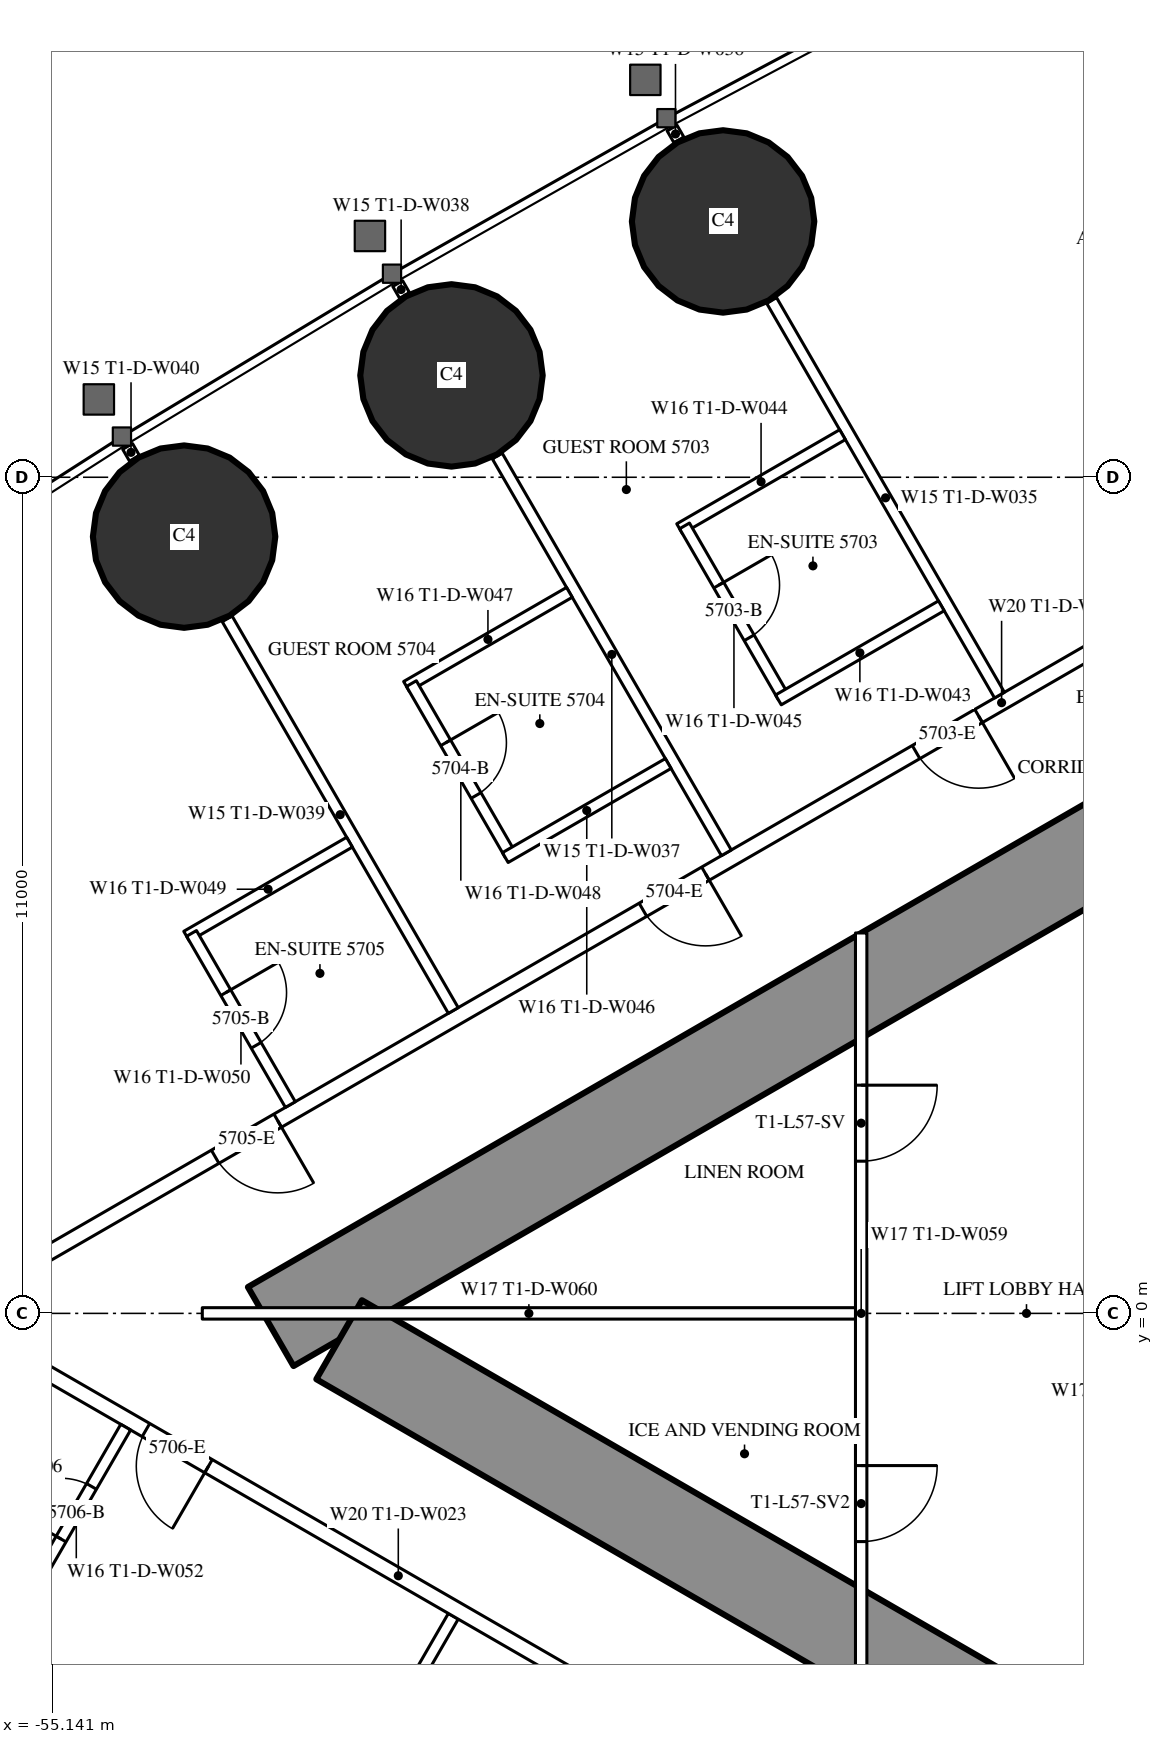
"""IFC4 building model, lengths in metres.
Left out: names, types, materials, properties, quantities, classifications, styles, units other than length and angle.
Written with IfcOpenShell. Run it as: python <this file> out.ifc"""

import sys

from ifc_helpers import new_model, si_unit, direction, frame, frame_2d, origin, origin_2d, place, context, subcontext, project, spatial, rectangle, circle, extrude, element, fill, save


model = new_model("IFC4")
c1 = context("Model", 3, precision=1e-05, world=origin(), true_north=direction((0.0, 1.0)))
c2 = subcontext(c1, "Body", "Model", "MODEL_VIEW")
j1 = project(units=[si_unit("LENGTHUNIT", "METRE"), si_unit("PLANEANGLEUNIT", "RADIAN")], contexts=[c1])
p1 = place(None, origin())
s1 = spatial("IfcSite", under=j1, at=p1, CompositionType="ELEMENT")
p2 = place(p1, origin())
s2 = spatial("IfcBuilding", under=s1, at=p2, CompositionType="ELEMENT")
p3 = place(p2, frame((0.0, 0.0, 215.3)))
s3 = spatial("IfcBuildingStorey", under=s2, at=p3, CompositionType="ELEMENT", Elevation=215.3)
for number, where, z_axis, x_axis in (
    (1, (-46.317, 14.365, 0.0), (0.0, 0.0, 1.0), (1.0, 0.0, 0.0)),
    (2, (-49.89, 12.34, 0.0), (0.0, 0.0, 1.0), (1.0, 0.0, 0.0)),
    (3, (-53.408, 10.219, 0.0), (0.0, 0.0, 1.0), (1.0, 0.0, 0.0)),
):
    element("IfcColumn", number, at=place(p3, frame(where, z_axis=z_axis, x_axis=x_axis)), inside=s3, PredefinedType="COLUMN", context=c2, shape_type="SweptSolid", body=[
        extrude(circle(Radius=1.2, at=origin_2d()), origin(), (0.0, 0.0, 1.0), 3.6),
    ])
p4 = place(p3, frame((-27.2, 14.3, 0.0), z_axis=(0.0, 0.0, 1.0), x_axis=(-0.866026593062, -0.499997940104, 0.0)))
e4 = element("IfcWall", 4, at=p4, inside=s3, PredefinedType="SHEAR", context=c2, shape_type="SweptSolid", body=[
    extrude(rectangle(XDim=28.946, YDim=1.2, at=frame_2d((14.473, 0.0))), origin(), (0.0, 0.0, 1.0), 3.6),
])
p5 = place(p4, frame((4.6, 0.0, 0.0)))
e5 = element("IfcOpeningElement", 5, at=p5, cuts=e4, PredefinedType="OPENING", context=c2, shape_type="SweptSolid", body=[
    extrude(rectangle(XDim=1.0, YDim=2.2, at=frame_2d((0.5, 1.1))), frame((0.0, 0.61, 0.0), z_axis=(0.0, -1.0, 0.0), x_axis=(1.0, 0.0, 0.0)), (0.0, 0.0, 1.0), 1.22),
])
p6 = place(p4, frame((13.395, 0.0, 0.0)))
e6 = element("IfcOpeningElement", 6, at=p6, cuts=e4, PredefinedType="OPENING", context=c2, shape_type="SweptSolid", body=[
    extrude(rectangle(XDim=1.8, YDim=2.2, at=frame_2d((0.9, 1.1))), frame((0.0, 0.61, 0.0), z_axis=(0.0, -1.0, 0.0), x_axis=(1.0, 0.0, 0.0)), (0.0, 0.0, 1.0), 1.22),
])
p7 = place(p3, frame((-27.2, -14.3, 0.0), z_axis=(0.0, 0.0, 1.0), x_axis=(-0.866024021859, 0.500002393557, 0.0)))
e7 = element("IfcWall", 7, at=p7, inside=s3, PredefinedType="SHEAR", context=c2, shape_type="SweptSolid", body=[
    extrude(rectangle(XDim=27.907, YDim=1.2, at=frame_2d((13.954, 0.0))), origin(), (0.0, 0.0, 1.0), 3.6),
])
p8 = place(p7, frame((4.6, 0.0, 0.0)))
e8 = element("IfcOpeningElement", 8, at=p8, cuts=e7, PredefinedType="OPENING", context=c2, shape_type="SweptSolid", body=[
    extrude(rectangle(XDim=1.0, YDim=2.2, at=frame_2d((0.5, 1.1))), frame((0.0, 0.61, 0.0), z_axis=(0.0, -1.0, 0.0), x_axis=(1.0, 0.0, 0.0)), (0.0, 0.0, 1.0), 1.22),
])
p9 = place(p7, frame((13.395, 0.0, 0.0)))
e9 = element("IfcOpeningElement", 9, at=p9, cuts=e7, PredefinedType="OPENING", context=c2, shape_type="SweptSolid", body=[
    extrude(rectangle(XDim=1.8, YDim=2.2, at=frame_2d((0.9, 1.1))), frame((0.0, 0.61, 0.0), z_axis=(0.0, -1.0, 0.0), x_axis=(1.0, 0.0, 0.0)), (0.0, 0.0, 1.0), 1.22),
])
p10 = place(p3, frame((-28.737, 16.068, 0.0), z_axis=(0.0, 0.0, 1.0), x_axis=(-0.866026057212, -0.499998868229, 0.0)))
e10 = element("IfcWall", 10, at=p10, inside=s3, PredefinedType="PARTITIONING", context=c2, shape_type="SweptSolid", body=[
    extrude(rectangle(XDim=32.137, YDim=0.2, at=frame_2d((16.068, 0.0))), origin(), (0.0, 0.0, 1.0), 3.35),
])
p11 = place(p10, frame((1.08, 0.0, 0.0)))
e11 = element("IfcOpeningElement", 11, at=p11, cuts=e10, PredefinedType="OPENING", context=c2, shape_type="SweptSolid", body=[
    extrude(rectangle(XDim=1.8, YDim=2.03, at=frame_2d((0.9, 1.015))), frame((0.0, 0.11, 0.0), z_axis=(0.0, -1.0, 0.0), x_axis=(1.0, 0.0, 0.0)), (0.0, 0.0, 1.0), 0.22),
])
p12 = place(p10, frame((6.86, 0.0, 0.0)))
e12 = element("IfcOpeningElement", 12, at=p12, cuts=e10, PredefinedType="OPENING", context=c2, shape_type="SweptSolid", body=[
    extrude(rectangle(XDim=1.0, YDim=2.2, at=frame_2d((0.5, 1.1))), frame((0.0, 0.11, 0.0), z_axis=(0.0, -1.0, 0.0), x_axis=(1.0, 0.0, 0.0)), (0.0, 0.0, 1.0), 0.22),
])
p13 = place(p10, frame((16.418, 0.0, 0.0)))
e13 = element("IfcOpeningElement", 13, at=p13, cuts=e10, PredefinedType="OPENING", context=c2, shape_type="SweptSolid", body=[
    extrude(rectangle(XDim=0.95, YDim=2.2, at=frame_2d((0.475, 1.1))), frame((0.0, 0.11, 0.0), z_axis=(0.0, -1.0, 0.0), x_axis=(1.0, 0.0, 0.0)), (0.0, 0.0, 1.0), 0.22),
])
p14 = place(p10, frame((20.567, 0.0, 0.0)))
e14 = element("IfcOpeningElement", 14, at=p14, cuts=e10, PredefinedType="OPENING", context=c2, shape_type="SweptSolid", body=[
    extrude(rectangle(XDim=0.95, YDim=2.2, at=frame_2d((0.475, 1.1))), frame((0.0, 0.11, 0.0), z_axis=(0.0, -1.0, 0.0), x_axis=(1.0, 0.0, 0.0)), (0.0, 0.0, 1.0), 0.22),
])
p15 = place(p10, frame((27.065, 0.0, 0.0)))
e15 = element("IfcOpeningElement", 15, at=p15, cuts=e10, PredefinedType="OPENING", context=c2, shape_type="SweptSolid", body=[
    extrude(rectangle(XDim=0.95, YDim=2.2, at=frame_2d((0.475, 1.1))), frame((0.0, 0.11, 0.0), z_axis=(0.0, -1.0, 0.0), x_axis=(1.0, 0.0, 0.0)), (0.0, 0.0, 1.0), 0.22),
])
p16 = place(p3, frame((-42.68, 8.134, 0.0), z_axis=(0.0, 0.0, 1.0), x_axis=(-0.499984479505, 0.866034364361, 0.0)))
e16 = element("IfcWall", 16, at=p16, inside=s3, PredefinedType="PARTITIONING", context=c2, shape_type="SweptSolid", body=[
    extrude(rectangle(XDim=5.995, YDim=0.15, at=frame_2d((2.998, 0.0))), origin(), (0.0, 0.0, 1.0), 2.45),
])
p17 = place(p3, frame((-46.898, 15.439, 0.0), z_axis=(0.0, 0.0, 1.0), x_axis=(-0.500232303069, 0.865891241997, 0.0)))
e17 = element("IfcWall", 17, at=p17, inside=s3, PredefinedType="PARTITIONING", context=c2, shape_type="SweptSolid", body=[
    extrude(rectangle(XDim=0.18, YDim=0.15, at=frame_2d((0.09, 0.0))), origin(), (0.0, 0.0, 1.0), 2.45),
])
p18 = place(p3, frame((-46.274, 6.059, 0.0), z_axis=(0.0, 0.0, 1.0), x_axis=(-0.500020471368, 0.866013584312, 0.0)))
e18 = element("IfcWall", 18, at=p18, inside=s3, PredefinedType="PARTITIONING", context=c2, shape_type="SweptSolid", body=[
    extrude(rectangle(XDim=6.028, YDim=0.15, at=frame_2d((3.014, 0.0))), origin(), (0.0, 0.0, 1.0), 2.45),
])
p19 = place(p3, frame((-50.508, 13.392, 0.0), z_axis=(0.0, 0.0, 1.0), x_axis=(-0.499644091975, 0.866230789891, 0.0)))
e19 = element("IfcWall", 19, at=p19, inside=s3, PredefinedType="PARTITIONING", context=c2, shape_type="SweptSolid", body=[
    extrude(rectangle(XDim=0.18, YDim=0.15, at=frame_2d((0.09, 0.0))), origin(), (0.0, 0.0, 1.0), 2.45),
])
p20 = place(p3, frame((-49.866, 3.985, 0.0), z_axis=(0.0, 0.0, 1.0), x_axis=(-0.500000694566, 0.866025002776, 0.0)))
e20 = element("IfcWall", 20, at=p20, inside=s3, PredefinedType="PARTITIONING", context=c2, shape_type="SweptSolid", body=[
    extrude(rectangle(XDim=5.95, YDim=0.15, at=frame_2d((2.975, 0.0))), origin(), (0.0, 0.0, 1.0), 2.45),
])
p21 = place(p3, frame((-54.061, 11.25, 0.0), z_axis=(0.0, 0.0, 1.0), x_axis=(-0.500391173478, 0.865799441849, 0.0)))
e21 = element("IfcWall", 21, at=p21, inside=s3, PredefinedType="PARTITIONING", context=c2, shape_type="SweptSolid", body=[
    extrude(rectangle(XDim=0.179, YDim=0.15, at=frame_2d((0.089, 0.0))), origin(), (0.0, 0.0, 1.0), 2.45),
])
p22 = place(p3, frame((-49.866, -3.985, 0.0), z_axis=(0.0, 0.0, 1.0), x_axis=(-0.500000694566, -0.866025002776, 0.0)))
e22 = element("IfcWall", 22, at=p22, inside=s3, PredefinedType="PARTITIONING", context=c2, shape_type="SweptSolid", body=[
    extrude(rectangle(XDim=5.95, YDim=0.15, at=frame_2d((2.975, 0.0))), origin(), (0.0, 0.0, 1.0), 2.45),
])
p23 = place(p22, frame((3.5, 0.0, 0.0)))
e23 = element("IfcOpeningElement", 23, at=p23, cuts=e22, PredefinedType="OPENING", context=c2, shape_type="SweptSolid", body=[
    extrude(rectangle(XDim=0.9, YDim=2.2, at=frame_2d((0.45, 1.1))), frame((0.0, 0.085, 0.0), z_axis=(0.0, -1.0, 0.0), x_axis=(1.0, 0.0, 0.0)), (0.0, 0.0, 1.0), 0.17),
])
p24 = place(p3, frame((-44.715, -6.844, 0.0), z_axis=(0.0, 0.0, 1.0), x_axis=(-0.866025261224, 0.500000246922, 0.0)))
e24 = element("IfcWall", 24, at=p24, inside=s3, PredefinedType="PARTITIONING", context=c2, shape_type="SweptSolid", body=[
    extrude(rectangle(XDim=13.567, YDim=0.2, at=frame_2d((6.783, 0.0))), origin(), (0.0, 0.0, 1.0), 3.35),
])
p25 = place(p24, frame((9.667, 0.0, 0.0)))
e25 = element("IfcOpeningElement", 25, at=p25, cuts=e24, PredefinedType="OPENING", context=c2, shape_type="SweptSolid", body=[
    extrude(rectangle(XDim=0.95, YDim=2.2, at=frame_2d((0.475, 1.1))), frame((0.0, 0.11, 0.0), z_axis=(0.0, -1.0, 0.0), x_axis=(1.0, 0.0, 0.0)), (0.0, 0.0, 1.0), 0.22),
])
p26 = place(p24, frame((2.117, 0.0, 0.0)))
e26 = element("IfcOpeningElement", 26, at=p26, cuts=e24, PredefinedType="OPENING", context=c2, shape_type="SweptSolid", body=[
    extrude(rectangle(XDim=0.95, YDim=2.2, at=frame_2d((0.475, 1.1))), frame((0.0, 0.11, 0.0), z_axis=(0.0, -1.0, 0.0), x_axis=(1.0, 0.0, 0.0)), (0.0, 0.0, 1.0), 0.22),
])
p27 = place(p24, frame((0.5, 0.0, 0.0)))
e27 = element("IfcOpeningElement", 27, at=p27, cuts=e24, PredefinedType="OPENING", context=c2, shape_type="SweptSolid", body=[
    extrude(rectangle(XDim=0.967, YDim=2.2, at=frame_2d((0.483, 1.1))), frame((0.0, 0.11, 0.0), z_axis=(0.0, -1.0, 0.0), x_axis=(1.0, 0.0, 0.0)), (0.0, 0.0, 1.0), 0.22),
])
p28 = place(p3, frame((-44.745, 11.56, 0.0), z_axis=(0.0, 0.0, 1.0), x_axis=(-0.866006523861, -0.500032699561, 0.0)))
e28 = element("IfcWall", 28, at=p28, inside=s3, PredefinedType="PARTITIONING", context=c2, shape_type="SweptSolid", body=[
    extrude(rectangle(XDim=2.475, YDim=0.15, at=frame_2d((1.237, 0.0))), origin(), (0.0, 0.0, 1.0), 3.35),
])
p29 = place(p3, frame((-45.524, 8.109, 0.0), z_axis=(0.0, 0.0, 1.0), x_axis=(-0.49997716683, 0.86603858612, 0.0)))
e29 = element("IfcWall", 29, at=p29, inside=s3, PredefinedType="PARTITIONING", context=c2, shape_type="SweptSolid", body=[
    extrude(rectangle(XDim=2.6, YDim=0.15, at=frame_2d((1.3, 0.0))), origin(), (0.0, 0.0, 1.0), 3.35),
])
p30 = place(p29, frame((0.9, 0.0, 0.0)))
e30 = element("IfcOpeningElement", 30, at=p30, cuts=e29, PredefinedType="OPENING", context=c2, shape_type="SweptSolid", body=[
    extrude(rectangle(XDim=0.8, YDim=2.2, at=frame_2d((0.4, 1.1))), frame((0.0, 0.085, 0.0), z_axis=(0.0, -1.0, 0.0), x_axis=(1.0, 0.0, 0.0)), (0.0, 0.0, 1.0), 0.17),
])
p31 = place(p3, frame((-43.445, 9.309, 0.0), z_axis=(0.0, 0.0, 1.0), x_axis=(-0.866031185235, -0.4999899861, 0.0)))
e31 = element("IfcWall", 31, at=p31, inside=s3, PredefinedType="PARTITIONING", context=c2, shape_type="SweptSolid", body=[
    extrude(rectangle(XDim=2.475, YDim=0.15, at=frame_2d((1.238, 0.0))), origin(), (0.0, 0.0, 1.0), 3.35),
])
p32 = place(p3, frame((-48.339, 9.486, 0.0), z_axis=(0.0, 0.0, 1.0), x_axis=(-0.866006523861, -0.500032699561, 0.0)))
e32 = element("IfcWall", 32, at=p32, inside=s3, PredefinedType="PARTITIONING", context=c2, shape_type="SweptSolid", body=[
    extrude(rectangle(XDim=2.475, YDim=0.15, at=frame_2d((1.237, 0.0))), origin(), (0.0, 0.0, 1.0), 3.35),
])
p33 = place(p3, frame((-49.117, 6.034, 0.0), z_axis=(0.0, 0.0, 1.0), x_axis=(-0.500006934395, 0.866021400173, 0.0)))
e33 = element("IfcWall", 33, at=p33, inside=s3, PredefinedType="PARTITIONING", context=c2, shape_type="SweptSolid", body=[
    extrude(rectangle(XDim=2.6, YDim=0.15, at=frame_2d((1.3, 0.0))), origin(), (0.0, 0.0, 1.0), 3.35),
])
p34 = place(p33, frame((0.9, 0.0, 0.0)))
e34 = element("IfcOpeningElement", 34, at=p34, cuts=e33, PredefinedType="OPENING", context=c2, shape_type="SweptSolid", body=[
    extrude(rectangle(XDim=0.8, YDim=2.2, at=frame_2d((0.4, 1.1))), frame((0.0, 0.085, 0.0), z_axis=(0.0, -1.0, 0.0), x_axis=(1.0, 0.0, 0.0)), (0.0, 0.0, 1.0), 0.17),
])
for number, where, z_axis, x_axis in (
    (35, (-47.039, 7.234, 0.0), (0.0, 0.0, 1.0), (-0.866, -0.5, 0.0)),
    (36, (-51.231, 6.199, 0.0), (0.0, 0.0, 1.0), (-0.866, -0.5, 0.0)),
):
    element("IfcWall", number, at=place(p3, frame(where, z_axis=z_axis, x_axis=x_axis)), inside=s3, PredefinedType="PARTITIONING", context=c2, shape_type="SweptSolid", body=[
        extrude(rectangle(XDim=2.475, YDim=0.15, at=frame_2d((1.238, 0.0))), origin(), (0.0, 0.0, 1.0), 3.35),
    ])
p35 = place(p3, frame((-52.01, 2.747, 0.0), z_axis=(0.0, 0.0, 1.0), x_axis=(-0.500006934395, 0.866021400173, 0.0)))
e37 = element("IfcWall", 37, at=p35, inside=s3, PredefinedType="PARTITIONING", context=c2, shape_type="SweptSolid", body=[
    extrude(rectangle(XDim=2.6, YDim=0.15, at=frame_2d((1.3, 0.0))), origin(), (0.0, 0.0, 1.0), 3.35),
])
p36 = place(p35, frame((0.9, 0.0, 0.0)))
e38 = element("IfcOpeningElement", 38, at=p36, cuts=e37, PredefinedType="OPENING", context=c2, shape_type="SweptSolid", body=[
    extrude(rectangle(XDim=0.8, YDim=2.2, at=frame_2d((0.4, 1.1))), frame((0.0, 0.085, 0.0), z_axis=(0.0, -1.0, 0.0), x_axis=(1.0, 0.0, 0.0)), (0.0, 0.0, 1.0), 0.17),
])
p37 = place(p3, frame((-54.176, -1.497, 0.0), z_axis=(0.0, 0.0, 1.0), x_axis=(-0.500006934395, -0.866021400173, 0.0)))
e39 = element("IfcWall", 39, at=p37, inside=s3, PredefinedType="PARTITIONING", context=c2, shape_type="SweptSolid", body=[
    extrude(rectangle(XDim=2.6, YDim=0.15, at=frame_2d((1.3, 0.0))), origin(), (0.0, 0.0, 1.0), 3.35),
])
p38 = place(p37, frame((0.9, 0.0, 0.0)))
e40 = element("IfcOpeningElement", 40, at=p38, cuts=e39, PredefinedType="OPENING", context=c2, shape_type="SweptSolid", body=[
    extrude(rectangle(XDim=0.8, YDim=2.2, at=frame_2d((0.4, 1.1))), frame((0.0, 0.085, 0.0), z_axis=(0.0, -1.0, 0.0), x_axis=(1.0, 0.0, 0.0)), (0.0, 0.0, 1.0), 0.17),
])
p39 = place(p3, frame((-44.5, 5.005, 0.0), z_axis=(0.0, 0.0, 1.0), x_axis=(0.0, -1.0, 0.0)))
e41 = element("IfcWall", 41, at=p39, inside=s3, PredefinedType="PARTITIONING", context=c2, shape_type="SweptSolid", body=[
    extrude(rectangle(XDim=10.009, YDim=0.15, at=frame_2d((5.005, 0.0))), origin(), (0.0, 0.0, 1.0), 2.5),
])
p40 = place(p39, frame((2.002, 0.0, 0.0)))
e42 = element("IfcOpeningElement", 42, at=p40, cuts=e41, PredefinedType="OPENING", context=c2, shape_type="SweptSolid", body=[
    extrude(rectangle(XDim=1.0, YDim=2.2, at=frame_2d((0.5, 1.1))), frame((0.0, 0.085, 0.0), z_axis=(0.0, -1.0, 0.0), x_axis=(1.0, 0.0, 0.0)), (0.0, 0.0, 1.0), 0.17),
])
p41 = place(p39, frame((7.007, 0.0, 0.0)))
e43 = element("IfcOpeningElement", 43, at=p41, cuts=e41, PredefinedType="OPENING", context=c2, shape_type="SweptSolid", body=[
    extrude(rectangle(XDim=1.0, YDim=2.2, at=frame_2d((0.5, 1.1))), frame((0.0, 0.085, 0.0), z_axis=(0.0, -1.0, 0.0), x_axis=(1.0, 0.0, 0.0)), (0.0, 0.0, 1.0), 0.17),
])
p42 = place(p3, frame((-44.575, 0.0, 0.0), z_axis=(0.0, 0.0, 1.0), x_axis=(-1.0, 0.0, 0.0)))
e44 = element("IfcWall", 44, at=p42, inside=s3, PredefinedType="PARTITIONING", context=c2, shape_type="SweptSolid", body=[
    extrude(rectangle(XDim=8.593, YDim=0.15, at=frame_2d((4.297, 0.0))), origin(), (0.0, 0.0, 1.0), 2.45),
])
p43 = place(p30, origin())
e45 = element("IfcDoor", 45, at=p43, inside=s3, OperationType="SINGLE_SWING_RIGHT", PredefinedType="DOOR", context=c2, shape_type="SweptSolid", body=[
    extrude(rectangle(XDim=0.8, YDim=2.2, at=frame_2d((0.4, 1.1))), frame((0.0, 0.025, 0.0), z_axis=(0.0, -1.0, 0.0), x_axis=(1.0, 0.0, 0.0)), (0.0, 0.0, 1.0), 0.05),
])
fill(e30, e45)
p44 = place(p13, origin())
e46 = element("IfcDoor", 46, at=p44, inside=s3, OperationType="SINGLE_SWING_LEFT", PredefinedType="DOOR", context=c2, shape_type="SweptSolid", body=[
    extrude(rectangle(XDim=0.95, YDim=2.2, at=frame_2d((0.475, 1.1))), frame((0.0, 0.025, 0.0), z_axis=(0.0, -1.0, 0.0), x_axis=(1.0, 0.0, 0.0)), (0.0, 0.0, 1.0), 0.05),
])
fill(e13, e46)
p45 = place(p34, origin())
e47 = element("IfcDoor", 47, at=p45, inside=s3, OperationType="SINGLE_SWING_RIGHT", PredefinedType="DOOR", context=c2, shape_type="SweptSolid", body=[
    extrude(rectangle(XDim=0.8, YDim=2.2, at=frame_2d((0.4, 1.1))), frame((0.0, 0.025, 0.0), z_axis=(0.0, -1.0, 0.0), x_axis=(1.0, 0.0, 0.0)), (0.0, 0.0, 1.0), 0.05),
])
fill(e34, e47)
p46 = place(p14, origin())
e48 = element("IfcDoor", 48, at=p46, inside=s3, OperationType="SINGLE_SWING_LEFT", PredefinedType="DOOR", context=c2, shape_type="SweptSolid", body=[
    extrude(rectangle(XDim=0.95, YDim=2.2, at=frame_2d((0.475, 1.1))), frame((0.0, 0.025, 0.0), z_axis=(0.0, -1.0, 0.0), x_axis=(1.0, 0.0, 0.0)), (0.0, 0.0, 1.0), 0.05),
])
fill(e14, e48)
p47 = place(p36, origin())
e49 = element("IfcDoor", 49, at=p47, inside=s3, OperationType="SINGLE_SWING_RIGHT", PredefinedType="DOOR", context=c2, shape_type="SweptSolid", body=[
    extrude(rectangle(XDim=0.8, YDim=2.2, at=frame_2d((0.4, 1.1))), frame((0.0, 0.025, 0.0), z_axis=(0.0, -1.0, 0.0), x_axis=(1.0, 0.0, 0.0)), (0.0, 0.0, 1.0), 0.05),
])
fill(e38, e49)
p48 = place(p15, origin())
e50 = element("IfcDoor", 50, at=p48, inside=s3, OperationType="SINGLE_SWING_LEFT", PredefinedType="DOOR", context=c2, shape_type="SweptSolid", body=[
    extrude(rectangle(XDim=0.95, YDim=2.2, at=frame_2d((0.475, 1.1))), frame((0.0, 0.025, 0.0), z_axis=(0.0, -1.0, 0.0), x_axis=(1.0, 0.0, 0.0)), (0.0, 0.0, 1.0), 0.05),
])
fill(e15, e50)
p49 = place(p38, origin())
e51 = element("IfcDoor", 51, at=p49, inside=s3, OperationType="SINGLE_SWING_RIGHT", PredefinedType="DOOR", context=c2, shape_type="SweptSolid", body=[
    extrude(rectangle(XDim=0.8, YDim=2.2, at=frame_2d((0.4, 1.1))), frame((0.0, 0.025, 0.0), z_axis=(0.0, -1.0, 0.0), x_axis=(1.0, 0.0, 0.0)), (0.0, 0.0, 1.0), 0.05),
])
fill(e40, e51)
p50 = place(p25, origin())
e52 = element("IfcDoor", 52, at=p50, inside=s3, OperationType="SINGLE_SWING_LEFT", PredefinedType="DOOR", context=c2, shape_type="SweptSolid", body=[
    extrude(rectangle(XDim=0.95, YDim=2.2, at=frame_2d((0.475, 1.1))), frame((0.0, 0.025, 0.0), z_axis=(0.0, -1.0, 0.0), x_axis=(1.0, 0.0, 0.0)), (0.0, 0.0, 1.0), 0.05),
])
fill(e25, e52)
p51 = place(p40, origin())
e53 = element("IfcDoor", 53, at=p51, inside=s3, OperationType="SINGLE_SWING_LEFT", PredefinedType="DOOR", context=c2, shape_type="SweptSolid", body=[
    extrude(rectangle(XDim=1.0, YDim=2.2, at=frame_2d((0.5, 1.1))), frame((0.0, 0.025, 0.0), z_axis=(0.0, -1.0, 0.0), x_axis=(1.0, 0.0, 0.0)), (0.0, 0.0, 1.0), 0.05),
])
fill(e42, e53)
p52 = place(p41, origin())
e54 = element("IfcDoor", 54, at=p52, inside=s3, OperationType="SINGLE_SWING_LEFT", PredefinedType="DOOR", context=c2, shape_type="SweptSolid", body=[
    extrude(rectangle(XDim=1.0, YDim=2.2, at=frame_2d((0.5, 1.1))), frame((0.0, 0.025, 0.0), z_axis=(0.0, -1.0, 0.0), x_axis=(1.0, 0.0, 0.0)), (0.0, 0.0, 1.0), 0.05),
])
fill(e43, e54)
save(model, sys.argv[1])
